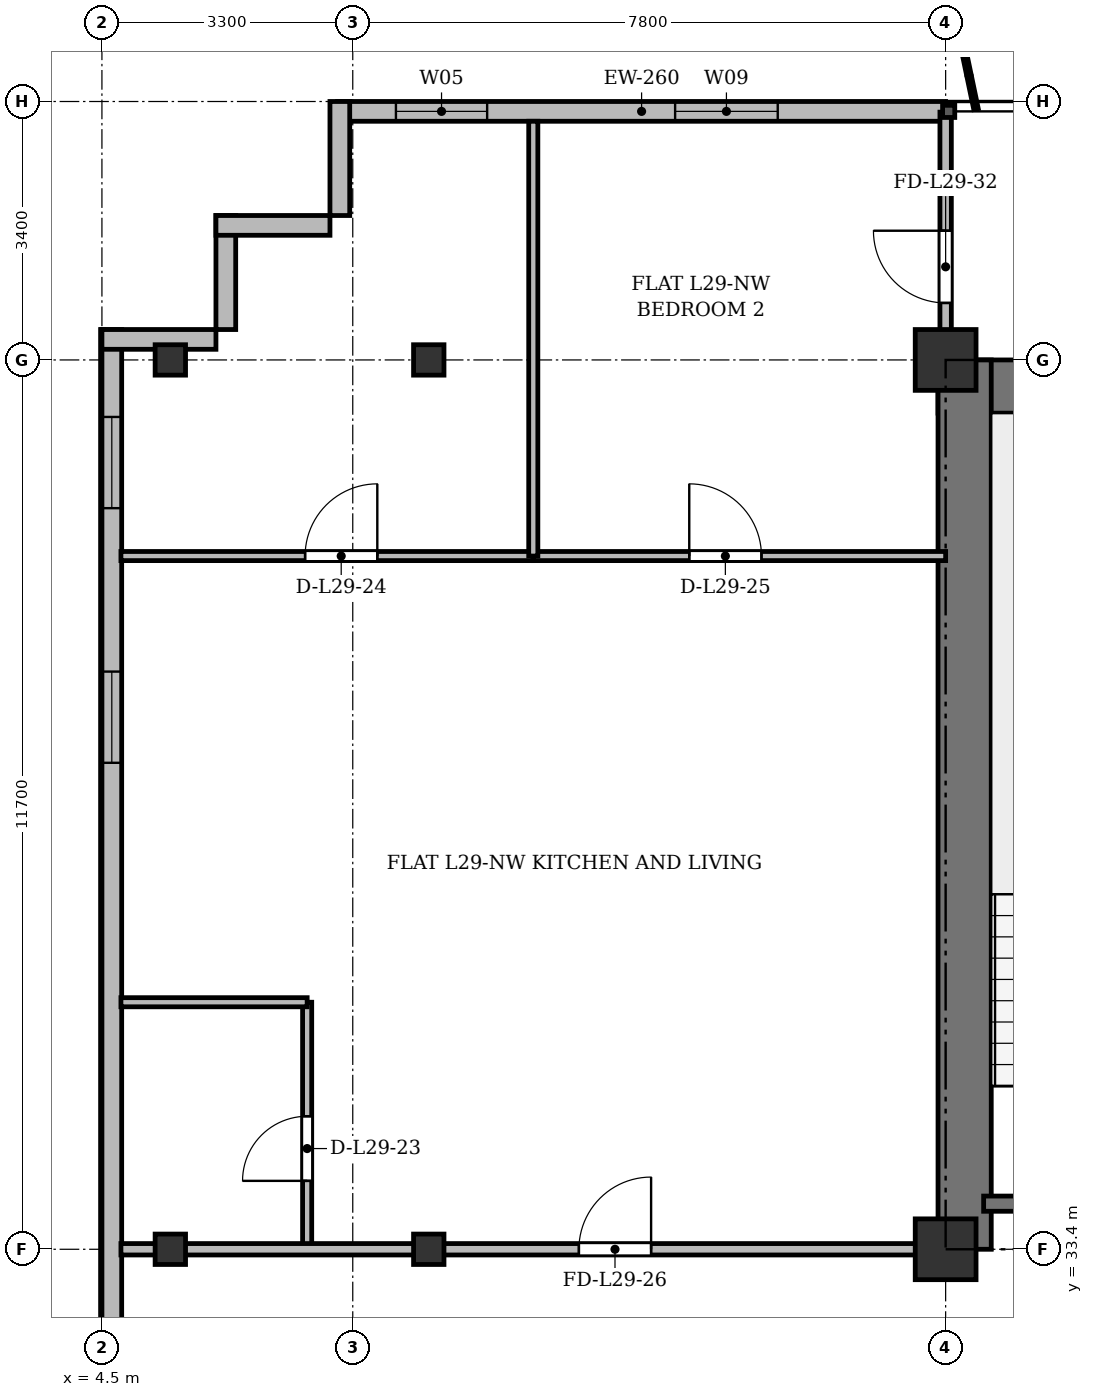
"""IFC4 building model, lengths in metres.
Left out: names, types, materials, properties, quantities, classifications, styles, units other than length and angle.
Written with IfcOpenShell. Run it as: python <this file> out.ifc"""

import sys

from ifc_helpers import new_model, si_unit, direction, frame, frame_2d, origin, origin_2d, place, context, subcontext, project, spatial, rectangle, i_section, extrude, source, transform, mapped, element, fill, save


model = new_model("IFC4")
c1 = context("Model", 3, precision=1e-05, world=origin(), true_north=direction((0.0, 1.0)))
c2 = subcontext(c1, "Body", "Model", "MODEL_VIEW")
j1 = project(units=[si_unit("LENGTHUNIT", "METRE"), si_unit("PLANEANGLEUNIT", "RADIAN")], contexts=[c1])
p1 = place(None, origin())
s1 = spatial("IfcSite", under=j1, at=p1, CompositionType="ELEMENT")
p2 = place(p1, origin())
s2 = spatial("IfcBuilding", under=s1, at=p2, CompositionType="ELEMENT")
p3 = place(p2, frame((0.0, 0.0, 114.1)))
s3 = spatial("IfcBuildingStorey", under=s2, at=p3, CompositionType="ELEMENT", Elevation=114.1)
m1 = source(origin(), c2, "Body", "SweptSolid", [
    extrude(i_section(OverallWidth=0.4, OverallDepth=0.4, WebThickness=0.022, FlangeThickness=0.035, at=origin_2d()), origin(), (0.0, 0.0, 1.0), 3.6),
])
for number, where, z_axis, x_axis in (
    (1, (5.4, 33.4, 0.0), (0.0, 0.0, 1.0), (1.0, 0.0, 0.0)),
    (2, (5.4, 45.1, 0.0), (0.0, 0.0, 1.0), (1.0, 0.0, 0.0)),
    (3, (8.8, 33.4, 0.0), (0.0, 0.0, 1.0), (1.0, 0.0, 0.0)),
    (4, (8.8, 45.1, 0.0), (0.0, 0.0, 1.0), (1.0, 0.0, 0.0)),
):
    element("IfcColumn", number, at=place(p3, frame(where, z_axis=z_axis, x_axis=x_axis)), inside=s3, PredefinedType="COLUMN", context=c2, shape_type="MappedRepresentation", body=[
        mapped(m1, transform((0.0, 0.0, 0.0), x_axis=(1.0, 0.0, 0.0), y_axis=(0.0, 1.0, 0.0), z_axis=(0.0, 0.0, 1.0), scale=1.0)),
    ])
m2 = source(origin(), c2, "Body", "SweptSolid", [
    extrude(rectangle(XDim=0.8, YDim=0.8, at=origin_2d()), origin(), (0.0, 0.0, 1.0), 3.6),
])
for number, where, z_axis, x_axis in (
    (5, (15.6, 33.4, 0.0), (0.0, 0.0, 1.0), (1.0, 0.0, 0.0)),
    (6, (15.6, 45.1, 0.0), (0.0, 0.0, 1.0), (1.0, 0.0, 0.0)),
):
    element("IfcColumn", number, at=place(p3, frame(where, z_axis=z_axis, x_axis=x_axis)), inside=s3, PredefinedType="COLUMN", context=c2, shape_type="MappedRepresentation", body=[
        mapped(m2, transform((0.0, 0.0, 0.0), x_axis=(1.0, 0.0, 0.0), y_axis=(0.0, 1.0, 0.0), z_axis=(0.0, 0.0, 1.0), scale=1.0)),
    ])
p4 = place(p3, frame((7.6, 48.37, 0.0), z_axis=(0.0, 0.0, 1.0), x_axis=(1.0, 0.0, 0.0)))
e7 = element("IfcWall", 7, at=p4, inside=s3, PredefinedType="SOLIDWALL", context=c2, shape_type="SweptSolid", body=[
    extrude(rectangle(XDim=8.0, YDim=0.26, at=frame_2d((4.0, 0.0))), origin(), (0.0, 0.0, 1.0), 3.34),
])
p5 = place(p4, frame((0.768, 0.0, 0.9)))
e8 = element("IfcOpeningElement", 8, at=p5, cuts=e7, PredefinedType="OPENING", context=c2, shape_type="SweptSolid", body=[
    extrude(rectangle(XDim=1.2, YDim=1.65, at=frame_2d((0.6, 0.825))), frame((0.0, 0.14, 0.0), z_axis=(0.0, -1.0, 0.0), x_axis=(1.0, 0.0, 0.0)), (0.0, 0.0, 1.0), 0.28),
])
p6 = place(p4, frame((4.441, 0.0, 0.9)))
e9 = element("IfcOpeningElement", 9, at=p6, cuts=e7, PredefinedType="OPENING", context=c2, shape_type="SweptSolid", body=[
    extrude(rectangle(XDim=1.35, YDim=1.5, at=frame_2d((0.675, 0.75))), frame((0.0, 0.14, 0.0), z_axis=(0.0, -1.0, 0.0), x_axis=(1.0, 0.0, 0.0)), (0.0, 0.0, 1.0), 0.28),
])
p7 = place(p3, frame((4.63, 5.9, 0.0), z_axis=(0.0, 0.0, 1.0), x_axis=(0.0, 1.0, 0.0)))
e10 = element("IfcWall", 10, at=p7, inside=s3, PredefinedType="SOLIDWALL", context=c2, shape_type="SweptSolid", body=[
    extrude(rectangle(XDim=39.6, YDim=0.26, at=frame_2d((19.8, 0.0))), origin(), (0.0, 0.0, 1.0), 3.34),
])
p8 = place(p7, frame((1.45, 0.0, 0.92)))
e11 = element("IfcOpeningElement", 11, at=p8, cuts=e10, PredefinedType="OPENING", context=c2, shape_type="SweptSolid", body=[
    extrude(rectangle(XDim=1.2, YDim=1.65, at=frame_2d((0.6, 0.825))), frame((0.0, 0.14, 0.0), z_axis=(0.0, -1.0, 0.0), x_axis=(1.0, 0.0, 0.0)), (0.0, 0.0, 1.0), 0.28),
])
p9 = place(p7, frame((4.3, 0.0, 0.92)))
e12 = element("IfcOpeningElement", 12, at=p9, cuts=e10, PredefinedType="OPENING", context=c2, shape_type="SweptSolid", body=[
    extrude(rectangle(XDim=2.4, YDim=2.1, at=frame_2d((1.2, 1.05))), frame((0.0, 0.14, 0.0), z_axis=(0.0, -1.0, 0.0), x_axis=(1.0, 0.0, 0.0)), (0.0, 0.0, 1.0), 0.28),
])
p10 = place(p7, frame((8.5, 0.0, 0.92)))
e13 = element("IfcOpeningElement", 13, at=p10, cuts=e10, PredefinedType="OPENING", context=c2, shape_type="SweptSolid", body=[
    extrude(rectangle(XDim=2.4, YDim=2.1, at=frame_2d((1.2, 1.05))), frame((0.0, 0.14, 0.0), z_axis=(0.0, -1.0, 0.0), x_axis=(1.0, 0.0, 0.0)), (0.0, 0.0, 1.0), 0.28),
])
p11 = place(p7, frame((15.7, 0.0, 0.92)))
e14 = element("IfcOpeningElement", 14, at=p11, cuts=e10, PredefinedType="OPENING", context=c2, shape_type="SweptSolid", body=[
    extrude(rectangle(XDim=2.4, YDim=2.1, at=frame_2d((1.2, 1.05))), frame((0.0, 0.14, 0.0), z_axis=(0.0, -1.0, 0.0), x_axis=(1.0, 0.0, 0.0)), (0.0, 0.0, 1.0), 0.28),
])
p12 = place(p7, frame((33.9, 0.0, 0.92)))
e15 = element("IfcOpeningElement", 15, at=p12, cuts=e10, PredefinedType="OPENING", context=c2, shape_type="SweptSolid", body=[
    extrude(rectangle(XDim=1.2, YDim=1.65, at=frame_2d((0.6, 0.825))), frame((0.0, 0.14, 0.0), z_axis=(0.0, -1.0, 0.0), x_axis=(1.0, 0.0, 0.0)), (0.0, 0.0, 1.0), 0.28),
])
p13 = place(p7, frame((37.25, 0.0, 0.92)))
e16 = element("IfcOpeningElement", 16, at=p13, cuts=e10, PredefinedType="OPENING", context=c2, shape_type="SweptSolid", body=[
    extrude(rectangle(XDim=1.2, YDim=1.65, at=frame_2d((0.6, 0.825))), frame((0.0, 0.14, 0.0), z_axis=(0.0, -1.0, 0.0), x_axis=(1.0, 0.0, 0.0)), (0.0, 0.0, 1.0), 0.28),
])
p14 = place(p3, frame((4.5, 45.37, 0.0), z_axis=(0.0, 0.0, 1.0), x_axis=(1.0, 0.0, 0.0)))
e17 = element("IfcWall", 17, at=p14, inside=s3, PredefinedType="SOLIDWALL", context=c2, shape_type="SweptSolid", body=[
    extrude(rectangle(XDim=1.5, YDim=0.26, at=frame_2d((0.75, 0.0))), origin(), (0.0, 0.0, 1.0), 2.752),
])
for number, where, z_axis, x_axis in (
    (18, (6.13, 45.5, 0.0), (0.0, 0.0, 1.0), (0.0, 1.0, 0.0)),
    (19, (6.0, 46.87, 0.0), (0.0, 0.0, 1.0), (1.0, 0.0, 0.0)),
    (20, (7.63, 47.0, 0.0), (0.0, 0.0, 1.0), (0.0, 1.0, 0.0)),
):
    element("IfcWall", number, at=place(p3, frame(where, z_axis=z_axis, x_axis=x_axis)), inside=s3, PredefinedType="SOLIDWALL", context=c2, shape_type="SweptSolid", body=[
        extrude(rectangle(XDim=1.5, YDim=0.26, at=frame_2d((0.75, 0.0))), origin(), (0.0, 0.0, 1.0), 3.34),
    ])
p15 = place(p3, frame((15.5, 44.75, 0.0), z_axis=(0.0, 0.0, 1.0), x_axis=(1.0, 0.0, 0.0)))
e21 = element("IfcWall", 21, at=p15, inside=s3, PredefinedType="SHEAR", context=c2, shape_type="SweptSolid", body=[
    extrude(rectangle(XDim=43.4, YDim=0.7, at=frame_2d((21.7, 0.0))), origin(), (0.0, 0.0, 1.0), 3.34),
])
p16 = place(p3, frame((15.85, 33.4, 0.0), z_axis=(0.0, 0.0, 1.0), x_axis=(0.0, 1.0, 0.0)))
e22 = element("IfcWall", 22, at=p16, inside=s3, PredefinedType="SHEAR", context=c2, shape_type="SweptSolid", body=[
    extrude(rectangle(XDim=11.7, YDim=0.7, at=frame_2d((5.85, 0.0))), origin(), (0.0, 0.0, 1.0), 3.34),
])
p17 = place(p3, frame((16.1, 34.0, 0.0), z_axis=(0.0, 0.0, 1.0), x_axis=(1.0, 0.0, 0.0)))
e23 = element("IfcWall", 23, at=p17, inside=s3, PredefinedType="SHEAR", context=c2, shape_type="SweptSolid", body=[
    extrude(rectangle(XDim=3.4, YDim=0.2, at=frame_2d((1.7, 0.0))), origin(), (0.0, 0.0, 1.0), 3.34),
])
p18 = place(p3, frame((7.2, 33.4, 0.0), z_axis=(0.0, 0.0, 1.0), x_axis=(0.0, 1.0, 0.0)))
e24 = element("IfcWall", 24, at=p18, inside=s3, PredefinedType="PARTITIONING", context=c2, shape_type="SweptSolid", body=[
    extrude(rectangle(XDim=3.25, YDim=0.12, at=frame_2d((1.625, 0.0))), origin(), (0.0, 0.0, 1.0), 2.752),
])
p19 = place(p18, frame((0.9, 0.0, 0.0)))
e25 = element("IfcOpeningElement", 25, at=p19, cuts=e24, PredefinedType="OPENING", context=c2, shape_type="SweptSolid", body=[
    extrude(rectangle(XDim=0.85, YDim=2.1, at=frame_2d((0.425, 1.05))), frame((0.0, 0.07, 0.0), z_axis=(0.0, -1.0, 0.0), x_axis=(1.0, 0.0, 0.0)), (0.0, 0.0, 1.0), 0.14),
])
p20 = place(p3, frame((4.75, 36.65, 0.0), z_axis=(0.0, 0.0, 1.0), x_axis=(1.0, 0.0, 0.0)))
e26 = element("IfcWall", 26, at=p20, inside=s3, PredefinedType="PARTITIONING", context=c2, shape_type="SweptSolid", body=[
    extrude(rectangle(XDim=2.45, YDim=0.12, at=frame_2d((1.225, 0.0))), origin(), (0.0, 0.0, 1.0), 2.84),
])
p21 = place(p3, frame((4.75, 42.52, 0.0), z_axis=(0.0, 0.0, 1.0), x_axis=(1.0, 0.0, 0.0)))
e27 = element("IfcWall", 27, at=p21, inside=s3, PredefinedType="PARTITIONING", context=c2, shape_type="SweptSolid", body=[
    extrude(rectangle(XDim=5.425, YDim=0.12, at=frame_2d((2.712, 0.0))), origin(), (0.0, 0.0, 1.0), 2.84),
])
p22 = place(p21, frame((2.423, 0.0, 0.0)))
e28 = element("IfcOpeningElement", 28, at=p22, cuts=e27, PredefinedType="OPENING", context=c2, shape_type="SweptSolid", body=[
    extrude(rectangle(XDim=0.95, YDim=2.15, at=frame_2d((0.475, 1.075))), frame((0.0, 0.07, 0.0), z_axis=(0.0, -1.0, 0.0), x_axis=(1.0, 0.0, 0.0)), (0.0, 0.0, 1.0), 0.14),
])
p23 = place(p3, frame((10.175, 42.52, 0.0), z_axis=(0.0, 0.0, 1.0), x_axis=(1.0, 0.0, 0.0)))
e29 = element("IfcWall", 29, at=p23, inside=s3, PredefinedType="PARTITIONING", context=c2, shape_type="SweptSolid", body=[
    extrude(rectangle(XDim=5.425, YDim=0.12, at=frame_2d((2.712, 0.0))), origin(), (0.0, 0.0, 1.0), 2.84),
])
p24 = place(p23, frame((2.052, 0.0, 0.0)))
e30 = element("IfcOpeningElement", 30, at=p24, cuts=e29, PredefinedType="OPENING", context=c2, shape_type="SweptSolid", body=[
    extrude(rectangle(XDim=0.95, YDim=2.15, at=frame_2d((0.475, 1.075))), frame((0.0, 0.07, 0.0), z_axis=(0.0, -1.0, 0.0), x_axis=(1.0, 0.0, 0.0)), (0.0, 0.0, 1.0), 0.14),
])
p25 = place(p3, frame((10.175, 42.52, 0.0), z_axis=(0.0, 0.0, 1.0), x_axis=(0.0, 1.0, 0.0)))
e31 = element("IfcWall", 31, at=p25, inside=s3, PredefinedType="PARTITIONING", context=c2, shape_type="SweptSolid", body=[
    extrude(rectangle(XDim=5.72, YDim=0.12, at=frame_2d((2.86, 0.0))), origin(), (0.0, 0.0, 1.0), 2.752),
])
p26 = place(p3, frame((4.75, 33.4, 0.0), z_axis=(0.0, 0.0, 1.0), x_axis=(1.0, 0.0, 0.0)))
e32 = element("IfcWall", 32, at=p26, inside=s3, PredefinedType="PARTITIONING", context=c2, shape_type="SweptSolid", body=[
    extrude(rectangle(XDim=10.85, YDim=0.15, at=frame_2d((5.425, 0.0))), origin(), (0.0, 0.0, 1.0), 2.752),
])
p27 = place(p26, frame((6.025, 0.0, 0.0)))
e33 = element("IfcOpeningElement", 33, at=p27, cuts=e32, PredefinedType="OPENING", context=c2, shape_type="SweptSolid", body=[
    extrude(rectangle(XDim=0.95, YDim=2.15, at=frame_2d((0.475, 1.075))), frame((0.0, 0.085, 0.0), z_axis=(0.0, -1.0, 0.0), x_axis=(1.0, 0.0, 0.0)), (0.0, 0.0, 1.0), 0.17),
])
p28 = place(p3, frame((15.6, 44.75, 0.0), z_axis=(0.0, 0.0, 1.0), x_axis=(0.0, 1.0, 0.0)))
e34 = element("IfcWall", 34, at=p28, inside=s3, PredefinedType="PARTITIONING", context=c2, shape_type="SweptSolid", body=[
    extrude(rectangle(XDim=3.61, YDim=0.15, at=frame_2d((1.805, 0.0))), origin(), (0.0, 0.0, 1.0), 2.84),
])
p29 = place(p28, frame((1.1, 0.0, 0.0)))
e35 = element("IfcOpeningElement", 35, at=p29, cuts=e34, PredefinedType="OPENING", context=c2, shape_type="SweptSolid", body=[
    extrude(rectangle(XDim=0.95, YDim=2.15, at=frame_2d((0.475, 1.075))), frame((0.0, 0.085, 0.0), z_axis=(0.0, -1.0, 0.0), x_axis=(1.0, 0.0, 0.0)), (0.0, 0.0, 1.0), 0.17),
])
m3 = source(origin(), c2, "Body", "SweptSolid", [
    extrude(rectangle(XDim=1.2, YDim=1.65, at=frame_2d((0.6, 0.825))), frame((0.0, 0.03, 0.0), z_axis=(0.0, -1.0, 0.0), x_axis=(1.0, 0.0, 0.0)), (0.0, 0.0, 1.0), 0.06),
])
p30 = place(p5, origin())
e36 = element("IfcWindow", 36, at=p30, inside=s3, PartitioningType="SINGLE_PANEL", PredefinedType="WINDOW", context=c2, shape_type="MappedRepresentation", body=[
    mapped(m3, transform((0.0, 0.0, 0.0), x_axis=(1.0, 0.0, 0.0), y_axis=(0.0, 1.0, 0.0), z_axis=(0.0, 0.0, 1.0), scale=1.0)),
])
fill(e8, e36)
m4 = source(origin(), c2, "Body", "SweptSolid", [
    extrude(rectangle(XDim=1.35, YDim=1.5, at=frame_2d((0.675, 0.75))), frame((0.0, 0.03, 0.0), z_axis=(0.0, -1.0, 0.0), x_axis=(1.0, 0.0, 0.0)), (0.0, 0.0, 1.0), 0.06),
])
p31 = place(p6, origin())
e37 = element("IfcWindow", 37, at=p31, inside=s3, PartitioningType="SINGLE_PANEL", PredefinedType="WINDOW", context=c2, shape_type="MappedRepresentation", body=[
    mapped(m4, transform((0.0, 0.0, 0.0), x_axis=(1.0, 0.0, 0.0), y_axis=(0.0, 1.0, 0.0), z_axis=(0.0, 0.0, 1.0), scale=1.0)),
])
fill(e9, e37)
p32 = place(p12, origin())
e38 = element("IfcWindow", 38, at=p32, inside=s3, PartitioningType="SINGLE_PANEL", PredefinedType="WINDOW", context=c2, shape_type="MappedRepresentation", body=[
    mapped(m3, transform((0.0, 0.0, 0.0), x_axis=(1.0, 0.0, 0.0), y_axis=(0.0, 1.0, 0.0), z_axis=(0.0, 0.0, 1.0), scale=1.0)),
])
fill(e15, e38)
p33 = place(p13, origin())
e39 = element("IfcWindow", 39, at=p33, inside=s3, PartitioningType="SINGLE_PANEL", PredefinedType="WINDOW", context=c2, shape_type="MappedRepresentation", body=[
    mapped(m3, transform((0.0, 0.0, 0.0), x_axis=(1.0, 0.0, 0.0), y_axis=(0.0, 1.0, 0.0), z_axis=(0.0, 0.0, 1.0), scale=1.0)),
])
fill(e16, e39)
m5 = source(origin(), c2, "Body", "SweptSolid", [
    extrude(rectangle(XDim=0.85, YDim=2.1, at=frame_2d((0.425, 1.05))), frame((0.0, 0.025, 0.0), z_axis=(0.0, -1.0, 0.0), x_axis=(1.0, 0.0, 0.0)), (0.0, 0.0, 1.0), 0.05),
])
p34 = place(p19, origin())
e40 = element("IfcDoor", 40, at=p34, inside=s3, OperationType="SINGLE_SWING_LEFT", PredefinedType="DOOR", context=c2, shape_type="MappedRepresentation", body=[
    mapped(m5, transform((0.0, 0.0, 0.0), x_axis=(1.0, 0.0, 0.0), y_axis=(0.0, 1.0, 0.0), z_axis=(0.0, 0.0, 1.0), scale=1.0)),
])
fill(e25, e40)
m6 = source(origin(), c2, "Body", "SweptSolid", [
    extrude(rectangle(XDim=0.95, YDim=2.15, at=frame_2d((0.475, 1.075))), frame((0.0, 0.025, 0.0), z_axis=(0.0, -1.0, 0.0), x_axis=(1.0, 0.0, 0.0)), (0.0, 0.0, 1.0), 0.05),
])
p35 = place(p22, origin())
e41 = element("IfcDoor", 41, at=p35, inside=s3, OperationType="SINGLE_SWING_RIGHT", PredefinedType="DOOR", context=c2, shape_type="MappedRepresentation", body=[
    mapped(m6, transform((0.0, 0.0, 0.0), x_axis=(1.0, 0.0, 0.0), y_axis=(0.0, 1.0, 0.0), z_axis=(0.0, 0.0, 1.0), scale=1.0)),
])
fill(e28, e41)
p36 = place(p24, origin())
e42 = element("IfcDoor", 42, at=p36, inside=s3, OperationType="SINGLE_SWING_LEFT", PredefinedType="DOOR", context=c2, shape_type="MappedRepresentation", body=[
    mapped(m6, transform((0.0, 0.0, 0.0), x_axis=(1.0, 0.0, 0.0), y_axis=(0.0, 1.0, 0.0), z_axis=(0.0, 0.0, 1.0), scale=1.0)),
])
fill(e30, e42)
p37 = place(p27, origin())
e43 = element("IfcDoor", 43, at=p37, inside=s3, OperationType="SINGLE_SWING_RIGHT", PredefinedType="DOOR", context=c2, shape_type="MappedRepresentation", body=[
    mapped(m6, transform((0.0, 0.0, 0.0), x_axis=(1.0, 0.0, 0.0), y_axis=(0.0, 1.0, 0.0), z_axis=(0.0, 0.0, 1.0), scale=1.0)),
])
fill(e33, e43)
p38 = place(p29, origin())
e44 = element("IfcDoor", 44, at=p38, inside=s3, OperationType="SINGLE_SWING_RIGHT", PredefinedType="DOOR", context=c2, shape_type="MappedRepresentation", body=[
    mapped(m6, transform((0.0, 0.0, 0.0), x_axis=(1.0, 0.0, 0.0), y_axis=(0.0, 1.0, 0.0), z_axis=(0.0, 0.0, 1.0), scale=1.0)),
])
fill(e35, e44)
save(model, sys.argv[1])
